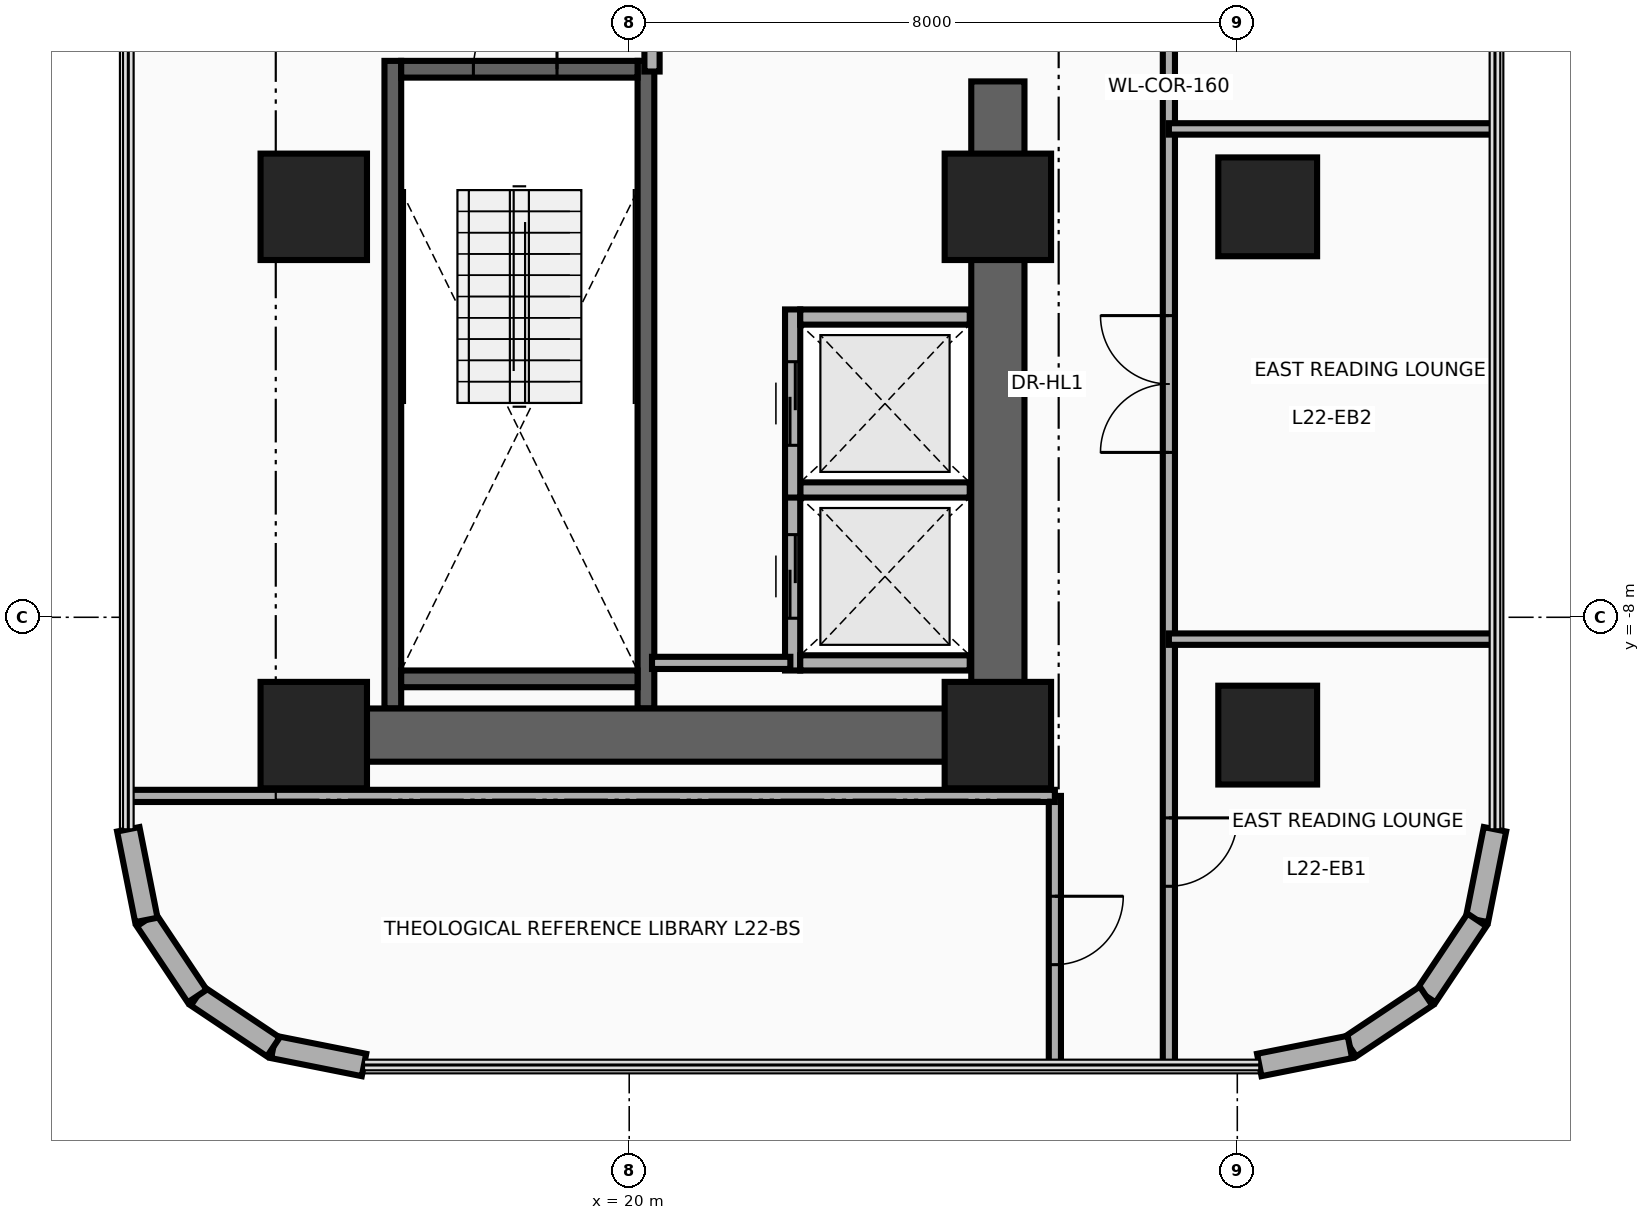
"""IFC4 building model, lengths in metres.
Left out: names, types, materials, properties, quantities, classifications, styles, units other than length and angle.
Written with IfcOpenShell. Run it as: python <this file> out.ifc"""

import sys

from ifc_helpers import new_model, si_unit, direction, frame, frame_2d, origin, origin_2d, place, context, subcontext, project, spatial, rectangle, circle, extrude, source, transform, mapped, element, fill, save


model = new_model("IFC4")
c1 = context("Model", 3, precision=1e-05, world=origin(), true_north=direction((0.0, 1.0)))
c2 = subcontext(c1, "Body", "Model", "MODEL_VIEW")
j1 = project(units=[si_unit("LENGTHUNIT", "METRE"), si_unit("PLANEANGLEUNIT", "RADIAN")], contexts=[c1])
p1 = place(None, origin())
s1 = spatial("IfcSite", under=j1, at=p1, CompositionType="ELEMENT")
p2 = place(p1, origin())
s2 = spatial("IfcBuilding", under=s1, at=p2, CompositionType="ELEMENT")
p3 = place(p2, frame((0.0, 0.0, 88.9)))
s3 = spatial("IfcBuildingStorey", under=s2, at=p3, CompositionType="ELEMENT", Elevation=88.9)
for number, where, z_axis, x_axis in (
    (1, (16.89, -9.2, 0.0), (0.0, 0.0, 1.0), (0.0, 1.0, 0.0)),
    (2, (20.22, -9.2, 0.0), (0.0, 0.0, 1.0), (0.0, 1.0, 0.0)),
):
    element("IfcWall", number, at=place(p3, frame(where, z_axis=z_axis, x_axis=x_axis)), inside=s3, PredefinedType="SHEAR", context=c2, shape_type="SweptSolid", body=[
        extrude(rectangle(XDim=8.52, YDim=0.22, at=frame_2d((4.26, 0.0))), origin(), (0.0, 0.0, 1.0), 3.46),
    ])
p4 = place(p3, frame((17.0, -8.81, 0.0), z_axis=(0.0, 0.0, 1.0), x_axis=(1.0, 0.0, 0.0)))
e3 = element("IfcWall", 3, at=p4, inside=s3, PredefinedType="SHEAR", context=c2, shape_type="SweptSolid", body=[
    extrude(rectangle(XDim=3.11, YDim=0.22, at=frame_2d((1.555, 0.0))), origin(), (0.0, 0.0, 1.0), 3.46),
])
p5 = place(p3, frame((17.0, -0.79, 0.0), z_axis=(0.0, 0.0, 1.0), x_axis=(1.0, 0.0, 0.0)))
e4 = element("IfcWall", 4, at=p5, inside=s3, PredefinedType="SHEAR", context=c2, shape_type="SweptSolid", body=[
    extrude(rectangle(XDim=3.11, YDim=0.22, at=frame_2d((1.555, 0.0))), origin(), (0.0, 0.0, 1.0), 3.46),
])
p6 = place(p5, frame((0.95, 0.0, 0.0)))
e5 = element("IfcOpeningElement", 5, at=p6, cuts=e4, PredefinedType="OPENING", context=c2, shape_type="SweptSolid", body=[
    extrude(rectangle(XDim=1.1, YDim=2.15, at=frame_2d((0.55, 1.075))), frame((0.0, 0.125, 0.0), z_axis=(0.0, -1.0, 0.0), x_axis=(1.0, 0.0, 0.0)), (0.0, 0.0, 1.0), 0.25),
])
p7 = place(p3, frame((24.85, -9.9, 0.0), z_axis=(0.0, 0.0, 1.0), x_axis=(0.0, 1.0, 0.0)))
e6 = element("IfcWall", 6, at=p7, inside=s3, PredefinedType="SHEAR", context=c2, shape_type="SweptSolid", body=[
    extrude(rectangle(XDim=8.95, YDim=0.7, at=frame_2d((4.475, 0.0))), origin(), (0.0, 0.0, 1.0), 3.46),
])
p8 = place(p3, frame((15.85, -9.55, 0.0), z_axis=(0.0, 0.0, 1.0), x_axis=(1.0, 0.0, 0.0)))
e7 = element("IfcWall", 7, at=p8, inside=s3, PredefinedType="SHEAR", context=c2, shape_type="SweptSolid", body=[
    extrude(rectangle(XDim=9.0, YDim=0.7, at=frame_2d((4.5, 0.0))), origin(), (0.0, 0.0, 1.0), 3.46),
])
m1 = source(origin(), c2, "Body", "SweptSolid", [
    extrude(rectangle(XDim=1.4, YDim=1.4, at=origin_2d()), origin(), (0.0, 0.0, 1.0), 3.7),
])
for number, where, z_axis, x_axis in (
    (8, (15.85, -9.55, 0.0), (0.0, 0.0, 1.0), (1.0, 0.0, 0.0)),
    (9, (24.85, -9.55, 0.0), (0.0, 0.0, 1.0), (1.0, 0.0, 0.0)),
):
    element("IfcColumn", number, at=place(p3, frame(where, z_axis=z_axis, x_axis=x_axis)), inside=s3, PredefinedType="COLUMN", context=c2, shape_type="MappedRepresentation", body=[
        mapped(m1, transform((0.0, 0.0, 0.0), x_axis=(1.0, 0.0, 0.0), y_axis=(0.0, 1.0, 0.0), z_axis=(0.0, 0.0, 1.0), scale=1.0)),
    ])
m2 = source(origin(), c2, "Body", "SweptSolid", [
    extrude(circle(Radius=0.65, at=origin_2d()), origin(), (0.0, 0.0, 1.0), 3.7),
])
p9 = place(p3, frame((28.4, -9.55, 0.0), z_axis=(0.0, 0.0, 1.0), x_axis=(1.0, 0.0, 0.0)))
e10 = element("IfcColumn", 10, at=p9, inside=s3, PredefinedType="COLUMN", context=c2, shape_type="MappedRepresentation", body=[
    mapped(m2, transform((0.0, 0.0, 0.0), x_axis=(1.0, 0.0, 0.0), y_axis=(0.0, 1.0, 0.0), z_axis=(0.0, 0.0, 1.0), scale=1.0)),
])
for number, where, z_axis, x_axis in (
    (11, (15.85, -2.6, 0.0), (0.0, 0.0, 1.0), (1.0, 0.0, 0.0)),
    (12, (24.85, -2.6, 0.0), (0.0, 0.0, 1.0), (1.0, 0.0, 0.0)),
):
    element("IfcColumn", number, at=place(p3, frame(where, z_axis=z_axis, x_axis=x_axis)), inside=s3, PredefinedType="COLUMN", context=c2, shape_type="MappedRepresentation", body=[
        mapped(m1, transform((0.0, 0.0, 0.0), x_axis=(1.0, 0.0, 0.0), y_axis=(0.0, 1.0, 0.0), z_axis=(0.0, 0.0, 1.0), scale=1.0)),
    ])
p10 = place(p3, frame((28.4, -2.6, 0.0), z_axis=(0.0, 0.0, 1.0), x_axis=(1.0, 0.0, 0.0)))
e13 = element("IfcColumn", 13, at=p10, inside=s3, PredefinedType="COLUMN", context=c2, shape_type="MappedRepresentation", body=[
    mapped(m2, transform((0.0, 0.0, 0.0), x_axis=(1.0, 0.0, 0.0), y_axis=(0.0, 1.0, 0.0), z_axis=(0.0, 0.0, 1.0), scale=1.0)),
])
p11 = place(p3, frame((31.39, -10.789, 0.0), z_axis=(0.0, 0.0, 1.0), x_axis=(-0.194996050505, -0.980804027463, 0.0)))
e14 = element("IfcWall", 14, at=p11, inside=s3, PredefinedType="SOLIDWALL", context=c2, shape_type="SweptSolid", body=[
    extrude(rectangle(XDim=1.216, YDim=0.3, at=frame_2d((0.608, 0.0))), origin(), (0.0, 0.0, 1.0), 3.46),
])
for number, where, z_axis, x_axis in (
    (15, (31.153, -11.982, 0.0), (0.0, 0.0, 1.0), (-0.556, -0.831, 0.0)),
    (16, (30.483, -12.983, 0.0), (0.0, 0.0, 1.0), (-0.831, -0.556, 0.0)),
):
    element("IfcWall", number, at=place(p3, frame(where, z_axis=z_axis, x_axis=x_axis)), inside=s3, PredefinedType="SOLIDWALL", context=c2, shape_type="SweptSolid", body=[
        extrude(rectangle(XDim=1.205, YDim=0.3, at=frame_2d((0.603, 0.0))), origin(), (0.0, 0.0, 1.0), 3.46),
    ])
for number, where, z_axis, x_axis in (
    (17, (29.482, -13.653, 0.0), (0.0, 0.0, 1.0), (-0.981, -0.195, 0.0)),
    (18, (16.511, -13.89, 0.0), (0.0, 0.0, 1.0), (-0.981, 0.195, 0.0)),
):
    element("IfcWall", number, at=place(p3, frame(where, z_axis=z_axis, x_axis=x_axis)), inside=s3, PredefinedType="SOLIDWALL", context=c2, shape_type="SweptSolid", body=[
        extrude(rectangle(XDim=1.216, YDim=0.3, at=frame_2d((0.608, 0.0))), origin(), (0.0, 0.0, 1.0), 3.46),
    ])
for number, where, z_axis, x_axis in (
    (19, (15.318, -13.653, 0.0), (0.0, 0.0, 1.0), (-0.831, 0.556, 0.0)),
    (20, (14.317, -12.983, 0.0), (0.0, 0.0, 1.0), (-0.556, 0.831, 0.0)),
):
    element("IfcWall", number, at=place(p3, frame(where, z_axis=z_axis, x_axis=x_axis)), inside=s3, PredefinedType="SOLIDWALL", context=c2, shape_type="SweptSolid", body=[
        extrude(rectangle(XDim=1.205, YDim=0.3, at=frame_2d((0.603, 0.0))), origin(), (0.0, 0.0, 1.0), 3.46),
    ])
p12 = place(p3, frame((13.647, -11.982, 0.0), z_axis=(0.0, 0.0, 1.0), x_axis=(-0.195189223115, 0.980765602568, 0.0)))
e21 = element("IfcWall", 21, at=p12, inside=s3, PredefinedType="SOLIDWALL", context=c2, shape_type="SweptSolid", body=[
    extrude(rectangle(XDim=1.216, YDim=0.3, at=frame_2d((0.608, 0.0))), origin(), (0.0, 0.0, 1.0), 3.46),
])
p13 = place(p3, frame((22.15, -8.7, 0.0), z_axis=(0.0, 0.0, 1.0), x_axis=(0.0, 1.0, 0.0)))
e22 = element("IfcWall", 22, at=p13, inside=s3, PredefinedType="MOVABLE", context=c2, shape_type="SweptSolid", body=[
    extrude(rectangle(XDim=2.475, YDim=0.2, at=frame_2d((1.237, 0.0))), origin(), (0.0, 0.0, 1.0), 3.46),
])
p14 = place(p13, frame((0.688, 0.0, 0.0)))
e23 = element("IfcOpeningElement", 23, at=p14, cuts=e22, PredefinedType="OPENING", context=c2, shape_type="SweptSolid", body=[
    extrude(rectangle(XDim=1.1, YDim=2.1, at=frame_2d((0.55, 1.05))), frame((0.0, 0.115, 0.0), z_axis=(0.0, -1.0, 0.0), x_axis=(1.0, 0.0, 0.0)), (0.0, 0.0, 1.0), 0.23),
])
for number, where, z_axis, x_axis in (
    (24, (22.25, -8.6, 0.0), (0.0, 0.0, 1.0), (1.0, 0.0, 0.0)),
    (25, (22.25, -6.325, 0.0), (0.0, 0.0, 1.0), (1.0, 0.0, 0.0)),
):
    element("IfcWall", number, at=place(p3, frame(where, z_axis=z_axis, x_axis=x_axis)), inside=s3, PredefinedType="MOVABLE", context=c2, shape_type="SweptSolid", body=[
        extrude(rectangle(XDim=2.23, YDim=0.2, at=frame_2d((1.115, 0.0))), origin(), (0.0, 0.0, 1.0), 3.46),
    ])
p15 = place(p3, frame((22.15, -6.425, 0.0), z_axis=(0.0, 0.0, 1.0), x_axis=(0.0, 1.0, 0.0)))
e26 = element("IfcWall", 26, at=p15, inside=s3, PredefinedType="MOVABLE", context=c2, shape_type="SweptSolid", body=[
    extrude(rectangle(XDim=2.475, YDim=0.2, at=frame_2d((1.238, 0.0))), origin(), (0.0, 0.0, 1.0), 3.46),
])
p16 = place(p15, frame((0.688, 0.0, 0.0)))
e27 = element("IfcOpeningElement", 27, at=p16, cuts=e26, PredefinedType="OPENING", context=c2, shape_type="SweptSolid", body=[
    extrude(rectangle(XDim=1.1, YDim=2.1, at=frame_2d((0.55, 1.05))), frame((0.0, 0.115, 0.0), z_axis=(0.0, -1.0, 0.0), x_axis=(1.0, 0.0, 0.0)), (0.0, 0.0, 1.0), 0.23),
])
p17 = place(p3, frame((22.25, -4.05, 0.0), z_axis=(0.0, 0.0, 1.0), x_axis=(1.0, 0.0, 0.0)))
e28 = element("IfcWall", 28, at=p17, inside=s3, PredefinedType="MOVABLE", context=c2, shape_type="SweptSolid", body=[
    extrude(rectangle(XDim=2.23, YDim=0.2, at=frame_2d((1.115, 0.0))), origin(), (0.0, 0.0, 1.0), 3.46),
])
p18 = place(p3, frame((20.3, -0.82, 0.0), z_axis=(0.0, 0.0, 1.0), x_axis=(0.0, 1.0, 0.0)))
e29 = element("IfcWall", 29, at=p18, inside=s3, PredefinedType="PARTITIONING", context=c2, shape_type="SweptSolid", body=[
    extrude(rectangle(XDim=1.64, YDim=0.2, at=frame_2d((0.82, 0.0))), origin(), (0.0, 0.0, 1.0), 3.46),
])
p19 = place(p18, frame((0.295, 0.0, 0.0)))
e30 = element("IfcOpeningElement", 30, at=p19, cuts=e29, PredefinedType="OPENING", context=c2, shape_type="SweptSolid", body=[
    extrude(rectangle(XDim=1.05, YDim=2.15, at=frame_2d((0.525, 1.075))), frame((0.0, 0.115, 0.0), z_axis=(0.0, -1.0, 0.0), x_axis=(1.0, 0.0, 0.0)), (0.0, 0.0, 1.0), 0.23),
])
p20 = place(p3, frame((20.3, -8.6, 0.0), z_axis=(0.0, 0.0, 1.0), x_axis=(1.0, 0.0, 0.0)))
e31 = element("IfcWall", 31, at=p20, inside=s3, PredefinedType="PARTITIONING", context=c2, shape_type="SweptSolid", body=[
    extrude(rectangle(XDim=1.82, YDim=0.16, at=frame_2d((0.91, 0.0))), origin(), (0.0, 0.0, 1.0), 3.46),
])
p21 = place(p3, frame((25.6, -13.89, 0.0), z_axis=(0.0, 0.0, 1.0), x_axis=(0.0, 1.0, 0.0)))
e32 = element("IfcWall", 32, at=p21, inside=s3, PredefinedType="PARTITIONING", context=c2, shape_type="SweptSolid", body=[
    extrude(rectangle(XDim=3.54, YDim=0.16, at=frame_2d((1.77, 0.0))), origin(), (0.0, 0.0, 1.0), 3.46),
])
p22 = place(p21, frame((1.32, 0.0, 0.0)))
e33 = element("IfcOpeningElement", 33, at=p22, cuts=e32, PredefinedType="OPENING", context=c2, shape_type="SweptSolid", body=[
    extrude(rectangle(XDim=0.9, YDim=2.1, at=frame_2d((0.45, 1.05))), frame((0.0, 0.095, 0.0), z_axis=(0.0, -1.0, 0.0), x_axis=(1.0, 0.0, 0.0)), (0.0, 0.0, 1.0), 0.19),
])
p23 = place(p3, frame((13.41, -10.35, 0.0), z_axis=(0.0, 0.0, 1.0), x_axis=(1.0, 0.0, 0.0)))
e34 = element("IfcWall", 34, at=p23, inside=s3, PredefinedType="PARTITIONING", context=c2, shape_type="SweptSolid", body=[
    extrude(rectangle(XDim=12.19, YDim=0.16, at=frame_2d((6.095, 0.0))), origin(), (0.0, 0.0, 1.0), 3.46),
])
p24 = place(p3, frame((27.1, -13.89, 0.0), z_axis=(0.0, 0.0, 1.0), x_axis=(0.0, 1.0, 0.0)))
e35 = element("IfcWall", 35, at=p24, inside=s3, PredefinedType="PARTITIONING", context=c2, shape_type="SweptSolid", body=[
    extrude(rectangle(XDim=25.74, YDim=0.16, at=frame_2d((12.87, 0.0))), origin(), (0.0, 0.0, 1.0), 2.583),
])
p25 = place(p24, frame((2.351, 0.0, 0.0)))
e36 = element("IfcOpeningElement", 36, at=p25, cuts=e35, PredefinedType="OPENING", context=c2, shape_type="SweptSolid", body=[
    extrude(rectangle(XDim=0.9, YDim=2.1, at=frame_2d((0.45, 1.05))), frame((0.0, 0.095, 0.0), z_axis=(0.0, -1.0, 0.0), x_axis=(1.0, 0.0, 0.0)), (0.0, 0.0, 1.0), 0.19),
])
p26 = place(p24, frame((8.059, 0.0, 0.0)))
e37 = element("IfcOpeningElement", 37, at=p26, cuts=e35, PredefinedType="OPENING", context=c2, shape_type="SweptSolid", body=[
    extrude(rectangle(XDim=1.8, YDim=2.15, at=frame_2d((0.9, 1.075))), frame((0.0, 0.095, 0.0), z_axis=(0.0, -1.0, 0.0), x_axis=(1.0, 0.0, 0.0)), (0.0, 0.0, 1.0), 0.19),
])
p27 = place(p24, frame((14.771, 0.0, 0.0)))
e38 = element("IfcOpeningElement", 38, at=p27, cuts=e35, PredefinedType="OPENING", context=c2, shape_type="SweptSolid", body=[
    extrude(rectangle(XDim=1.8, YDim=2.15, at=frame_2d((0.9, 1.075))), frame((0.0, 0.095, 0.0), z_axis=(0.0, -1.0, 0.0), x_axis=(1.0, 0.0, 0.0)), (0.0, 0.0, 1.0), 0.19),
])
p28 = place(p24, frame((20.788, 0.0, 0.0)))
e39 = element("IfcOpeningElement", 39, at=p28, cuts=e35, PredefinedType="OPENING", context=c2, shape_type="SweptSolid", body=[
    extrude(rectangle(XDim=1.8, YDim=2.15, at=frame_2d((0.9, 1.075))), frame((0.0, 0.095, 0.0), z_axis=(0.0, -1.0, 0.0), x_axis=(1.0, 0.0, 0.0)), (0.0, 0.0, 1.0), 0.19),
])
for number, where, z_axis, x_axis in (
    (40, (27.1, -8.288, 0.0), (0.0, 0.0, 1.0), (1.0, 0.0, 0.0)),
    (41, (27.1, -1.575, 0.0), (0.0, 0.0, 1.0), (1.0, 0.0, 0.0)),
):
    element("IfcWall", number, at=place(p3, frame(where, z_axis=z_axis, x_axis=x_axis)), inside=s3, PredefinedType="PARTITIONING", context=c2, shape_type="SweptSolid", body=[
        extrude(rectangle(XDim=4.29, YDim=0.15, at=frame_2d((2.145, 0.0))), origin(), (0.0, 0.0, 1.0), 2.896),
    ])
p29 = place(p14, origin())
e42 = element("IfcDoor", 42, at=p29, inside=s3, OperationType="DOUBLE_DOOR_SLIDING", PredefinedType="DOOR", context=c2, shape_type="SweptSolid", body=[
    extrude(rectangle(XDim=1.1, YDim=2.1, at=frame_2d((0.55, 1.05))), frame((0.0, 0.025, 0.0), z_axis=(0.0, -1.0, 0.0), x_axis=(1.0, 0.0, 0.0)), (0.0, 0.0, 1.0), 0.05),
])
fill(e23, e42)
p30 = place(p16, origin())
e43 = element("IfcDoor", 43, at=p30, inside=s3, OperationType="DOUBLE_DOOR_SLIDING", PredefinedType="DOOR", context=c2, shape_type="SweptSolid", body=[
    extrude(rectangle(XDim=1.1, YDim=2.1, at=frame_2d((0.55, 1.05))), frame((0.0, 0.025, 0.0), z_axis=(0.0, -1.0, 0.0), x_axis=(1.0, 0.0, 0.0)), (0.0, 0.0, 1.0), 0.05),
])
fill(e27, e43)
p31 = place(p6, origin())
e44 = element("IfcDoor", 44, at=p31, inside=s3, OperationType="SINGLE_SWING_RIGHT", PredefinedType="DOOR", context=c2, shape_type="SweptSolid", body=[
    extrude(rectangle(XDim=1.1, YDim=2.15, at=frame_2d((0.55, 1.075))), frame((0.0, 0.025, 0.0), z_axis=(0.0, -1.0, 0.0), x_axis=(1.0, 0.0, 0.0)), (0.0, 0.0, 1.0), 0.05),
])
fill(e5, e44)
p32 = place(p22, frame((0.9, 0.0, 0.0), z_axis=(0.0, 0.0, 1.0), x_axis=(-1.0, 0.0, 0.0)))
e45 = element("IfcDoor", 45, at=p32, inside=s3, OperationType="SINGLE_SWING_LEFT", PredefinedType="DOOR", context=c2, shape_type="SweptSolid", body=[
    extrude(rectangle(XDim=0.9, YDim=2.1, at=frame_2d((0.45, 1.05))), frame((0.0, 0.025, 0.0), z_axis=(0.0, -1.0, 0.0), x_axis=(1.0, 0.0, 0.0)), (0.0, 0.0, 1.0), 0.05),
])
fill(e33, e45)
p33 = place(p25, frame((0.9, 0.0, 0.0), z_axis=(0.0, 0.0, 1.0), x_axis=(-1.0, 0.0, 0.0)))
e46 = element("IfcDoor", 46, at=p33, inside=s3, OperationType="SINGLE_SWING_LEFT", PredefinedType="DOOR", context=c2, shape_type="SweptSolid", body=[
    extrude(rectangle(XDim=0.9, YDim=2.1, at=frame_2d((0.45, 1.05))), frame((0.0, 0.025, 0.0), z_axis=(0.0, -1.0, 0.0), x_axis=(1.0, 0.0, 0.0)), (0.0, 0.0, 1.0), 0.05),
])
fill(e36, e46)
p34 = place(p26, origin())
e47 = element("IfcDoor", 47, at=p34, inside=s3, OperationType="DOUBLE_DOOR_SINGLE_SWING", PredefinedType="DOOR", context=c2, shape_type="SweptSolid", body=[
    extrude(rectangle(XDim=1.8, YDim=2.15, at=frame_2d((0.9, 1.075))), frame((0.0, 0.025, 0.0), z_axis=(0.0, -1.0, 0.0), x_axis=(1.0, 0.0, 0.0)), (0.0, 0.0, 1.0), 0.05),
])
fill(e37, e47)
save(model, sys.argv[1])
